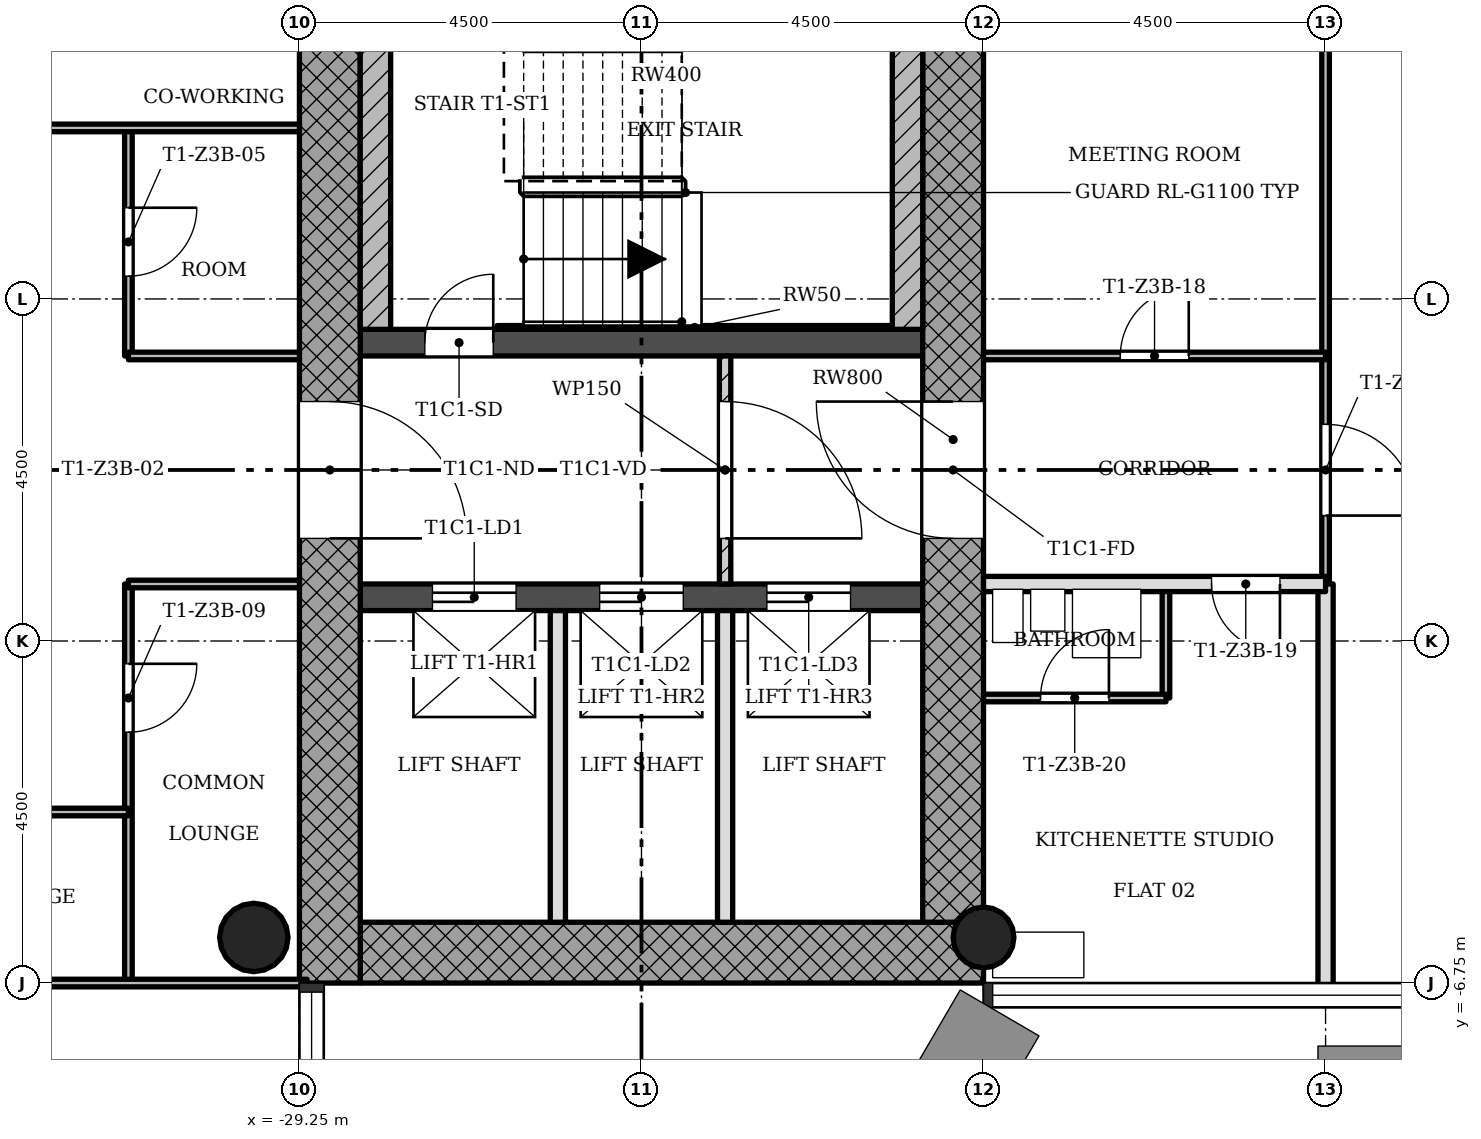
"""IFC4 building model, lengths in metres.
Left out: names, types, materials, properties, quantities, classifications, styles, units other than length and angle.
Written with IfcOpenShell. Run it as: python <this file> out.ifc"""

import sys

from ifc_helpers import new_model, si_unit, direction, frame, frame_2d, origin, origin_2d, place, context, subcontext, project, spatial, rectangle, hollow_circle, extrude, element, fill, save


model = new_model("IFC4")
c1 = context("Model", 3, precision=1e-05, world=origin(), true_north=direction((0.0, 1.0)))
c2 = subcontext(c1, "Body", "Model", "MODEL_VIEW")
j1 = project(units=[si_unit("LENGTHUNIT", "METRE"), si_unit("PLANEANGLEUNIT", "RADIAN")], contexts=[c1])
p1 = place(None, origin())
s1 = spatial("IfcSite", under=j1, at=p1, CompositionType="ELEMENT")
p2 = place(p1, origin())
s2 = spatial("IfcBuilding", under=s1, at=p2, CompositionType="ELEMENT")
p3 = place(p2, frame((0.0, 0.0, 143.9)))
s3 = spatial("IfcBuildingStorey", under=s2, at=p3, CompositionType="ELEMENT", Elevation=143.9)
p4 = place(p3, frame((-28.45, -6.35, 0.0), z_axis=(0.0, 0.0, 1.0), x_axis=(1.0, 0.0, 0.0)))
e1 = element("IfcWall", 1, at=p4, inside=s3, PredefinedType="SHEAR", context=c2, shape_type="SweptSolid", body=[
    extrude(rectangle(XDim=8.2, YDim=0.8, at=frame_2d((4.1, 0.0))), origin(), (0.0, 0.0, 1.0), 3.4),
])
p5 = place(p3, frame((-20.65, -5.95, 0.0), z_axis=(0.0, 0.0, 1.0), x_axis=(0.0, 1.0, 0.0)))
e2 = element("IfcWall", 2, at=p5, inside=s3, PredefinedType="SHEAR", context=c2, shape_type="SweptSolid", body=[
    extrude(rectangle(XDim=12.7, YDim=0.8, at=frame_2d((6.35, 0.0))), origin(), (0.0, 0.0, 1.0), 3.4),
])
p6 = place(p5, frame((5.05, 0.0, 0.0)))
e3 = element("IfcOpeningElement", 3, at=p6, cuts=e2, PredefinedType="OPENING", context=c2, shape_type="SweptSolid", body=[
    extrude(rectangle(XDim=1.8, YDim=2.1, at=frame_2d((0.9, 1.05))), frame((0.0, 0.41, 0.0), z_axis=(0.0, -1.0, 0.0), x_axis=(1.0, 0.0, 0.0)), (0.0, 0.0, 1.0), 0.82),
])
p7 = place(p3, frame((-28.85, 5.95, 0.0), z_axis=(0.0, 0.0, 1.0), x_axis=(0.0, -1.0, 0.0)))
e4 = element("IfcWall", 4, at=p7, inside=s3, PredefinedType="SHEAR", context=c2, shape_type="SweptSolid", body=[
    extrude(rectangle(XDim=12.7, YDim=0.8, at=frame_2d((6.35, 0.0))), origin(), (0.0, 0.0, 1.0), 3.4),
])
p8 = place(p7, frame((5.05, 0.0, 0.0)))
e5 = element("IfcOpeningElement", 5, at=p8, cuts=e4, PredefinedType="OPENING", context=c2, shape_type="SweptSolid", body=[
    extrude(rectangle(XDim=1.8, YDim=2.1, at=frame_2d((0.9, 1.05))), frame((0.0, 0.41, 0.0), z_axis=(0.0, -1.0, 0.0), x_axis=(1.0, 0.0, 0.0)), (0.0, 0.0, 1.0), 0.82),
])
p9 = place(p3, frame((-28.45, -1.675, 0.0), z_axis=(0.0, 0.0, 1.0), x_axis=(1.0, 0.0, 0.0)))
e6 = element("IfcWall", 6, at=p9, inside=s3, PredefinedType="SHEAR", context=c2, shape_type="SweptSolid", body=[
    extrude(rectangle(XDim=7.4, YDim=0.35, at=frame_2d((3.7, 0.0))), origin(), (0.0, 0.0, 1.0), 3.4),
])
p10 = place(p9, frame((0.95, 0.0, 0.0)))
e7 = element("IfcOpeningElement", 7, at=p10, cuts=e6, PredefinedType="OPENING", context=c2, shape_type="SweptSolid", body=[
    extrude(rectangle(XDim=1.1, YDim=2.1, at=frame_2d((0.55, 1.05))), frame((0.0, 0.185, 0.0), z_axis=(0.0, -1.0, 0.0), x_axis=(1.0, 0.0, 0.0)), (0.0, 0.0, 1.0), 0.37),
])
p11 = place(p9, frame((3.15, 0.0, 0.0)))
e8 = element("IfcOpeningElement", 8, at=p11, cuts=e6, PredefinedType="OPENING", context=c2, shape_type="SweptSolid", body=[
    extrude(rectangle(XDim=1.1, YDim=2.1, at=frame_2d((0.55, 1.05))), frame((0.0, 0.185, 0.0), z_axis=(0.0, -1.0, 0.0), x_axis=(1.0, 0.0, 0.0)), (0.0, 0.0, 1.0), 0.37),
])
p12 = place(p9, frame((5.35, 0.0, 0.0)))
e9 = element("IfcOpeningElement", 9, at=p12, cuts=e6, PredefinedType="OPENING", context=c2, shape_type="SweptSolid", body=[
    extrude(rectangle(XDim=1.1, YDim=2.1, at=frame_2d((0.55, 1.05))), frame((0.0, 0.185, 0.0), z_axis=(0.0, -1.0, 0.0), x_axis=(1.0, 0.0, 0.0)), (0.0, 0.0, 1.0), 0.37),
])
p13 = place(p3, frame((-28.45, 1.675, 0.0), z_axis=(0.0, 0.0, 1.0), x_axis=(1.0, 0.0, 0.0)))
e10 = element("IfcWall", 10, at=p13, inside=s3, PredefinedType="SHEAR", context=c2, shape_type="SweptSolid", body=[
    extrude(rectangle(XDim=7.4, YDim=0.35, at=frame_2d((3.7, 0.0))), origin(), (0.0, 0.0, 1.0), 3.4),
])
p14 = place(p13, frame((0.85, 0.0, 0.0)))
e11 = element("IfcOpeningElement", 11, at=p14, cuts=e10, PredefinedType="OPENING", context=c2, shape_type="SweptSolid", body=[
    extrude(rectangle(XDim=0.9, YDim=2.1, at=frame_2d((0.45, 1.05))), frame((0.0, 0.185, 0.0), z_axis=(0.0, -1.0, 0.0), x_axis=(1.0, 0.0, 0.0)), (0.0, 0.0, 1.0), 0.37),
])
p15 = place(p3, frame((-20.25, -6.15, 0.0), z_axis=(0.0, 0.0, 1.0), x_axis=(1.0, 0.0, 0.0)))
e12 = element("IfcColumn", 12, at=p15, inside=s3, PredefinedType="COLUMN", context=c2, shape_type="SweptSolid", body=[
    extrude(hollow_circle(Radius=0.4, WallThickness=0.028, at=origin_2d()), origin(), (0.0, 0.0, 1.0), 3.4),
])
p16 = place(p3, frame((-29.85, -6.15, 0.0), z_axis=(0.0, 0.0, 1.0), x_axis=(1.0, 0.0, 0.0)))
e13 = element("IfcColumn", 13, at=p16, inside=s3, PredefinedType="COLUMN", context=c2, shape_type="SweptSolid", body=[
    extrude(hollow_circle(Radius=0.45, WallThickness=0.032, at=origin_2d()), origin(), (0.0, 0.0, 1.0), 3.4),
])
p17 = place(p3, frame((-23.65, -1.5, 0.0), z_axis=(0.0, 0.0, 1.0), x_axis=(0.0, 1.0, 0.0)))
e14 = element("IfcWall", 14, at=p17, inside=s3, PredefinedType="PARTITIONING", context=c2, shape_type="SweptSolid", body=[
    extrude(rectangle(XDim=3.0, YDim=0.15, at=frame_2d((1.5, 0.0))), origin(), (0.0, 0.0, 1.0), 3.0),
])
p18 = place(p17, frame((0.6, 0.0, 0.0)))
e15 = element("IfcOpeningElement", 15, at=p18, cuts=e14, PredefinedType="OPENING", context=c2, shape_type="SweptSolid", body=[
    extrude(rectangle(XDim=1.8, YDim=2.1, at=frame_2d((0.9, 1.05))), frame((0.0, 0.085, 0.0), z_axis=(0.0, -1.0, 0.0), x_axis=(1.0, 0.0, 0.0)), (0.0, 0.0, 1.0), 0.17),
])
for number, where, z_axis, x_axis in (
    (16, (-25.85, -5.95, 0.0), (0.0, 0.0, 1.0), (0.0, 1.0, 0.0)),
    (17, (-23.65, -5.95, 0.0), (0.0, 0.0, 1.0), (0.0, 1.0, 0.0)),
):
    element("IfcWall", number, at=place(p3, frame(where, z_axis=z_axis, x_axis=x_axis)), inside=s3, PredefinedType="SOLIDWALL", context=c2, shape_type="SweptSolid", body=[
        extrude(rectangle(XDim=4.1, YDim=0.2, at=frame_2d((2.05, 0.0))), origin(), (0.0, 0.0, 1.0), 3.0),
    ])
p19 = place(p3, frame((-31.5, -6.75, 0.0), z_axis=(0.0, 0.0, 1.0), x_axis=(0.0, 1.0, 0.0)))
e18 = element("IfcWall", 18, at=p19, inside=s3, PredefinedType="PARTITIONING", context=c2, shape_type="SweptSolid", body=[
    extrude(rectangle(XDim=5.25, YDim=0.1, at=frame_2d((2.625, 0.0))), origin(), (0.0, 0.0, 1.0), 3.0),
])
p20 = place(p19, frame((3.3, 0.0, 0.0)))
e19 = element("IfcOpeningElement", 19, at=p20, cuts=e18, PredefinedType="OPENING", context=c2, shape_type="SweptSolid", body=[
    extrude(rectangle(XDim=0.9, YDim=2.1, at=frame_2d((0.45, 1.05))), frame((0.0, 0.06, 0.0), z_axis=(0.0, -1.0, 0.0), x_axis=(1.0, 0.0, 0.0)), (0.0, 0.0, 1.0), 0.12),
])
p21 = place(p3, frame((-31.5, 1.5, 0.0), z_axis=(0.0, 0.0, 1.0), x_axis=(0.0, 1.0, 0.0)))
e20 = element("IfcWall", 20, at=p21, inside=s3, PredefinedType="PARTITIONING", context=c2, shape_type="SweptSolid", body=[
    extrude(rectangle(XDim=3.0, YDim=0.1, at=frame_2d((1.5, 0.0))), origin(), (0.0, 0.0, 1.0), 3.0),
])
p22 = place(p21, frame((1.05, 0.0, 0.0)))
e21 = element("IfcOpeningElement", 21, at=p22, cuts=e20, PredefinedType="OPENING", context=c2, shape_type="SweptSolid", body=[
    extrude(rectangle(XDim=0.9, YDim=2.1, at=frame_2d((0.45, 1.05))), frame((0.0, 0.06, 0.0), z_axis=(0.0, -1.0, 0.0), x_axis=(1.0, 0.0, 0.0)), (0.0, 0.0, 1.0), 0.12),
])
p23 = place(p3, frame((-17.85, -3.0, 0.0), z_axis=(0.0, 0.0, 1.0), x_axis=(0.0, 1.0, 0.0)))
e22 = element("IfcWall", 22, at=p23, inside=s3, PredefinedType="PARTITIONING", context=c2, shape_type="SweptSolid", body=[
    extrude(rectangle(XDim=1.5, YDim=0.1, at=frame_2d((0.75, 0.0))), origin(), (0.0, 0.0, 1.0), 3.0),
])
p24 = place(p3, frame((-15.75, -1.5, 0.0), z_axis=(0.0, 0.0, 1.0), x_axis=(0.0, 1.0, 0.0)))
e23 = element("IfcWall", 23, at=p24, inside=s3, PredefinedType="PARTITIONING", context=c2, shape_type="SweptSolid", body=[
    extrude(rectangle(XDim=8.35, YDim=0.1, at=frame_2d((4.175, 0.0))), origin(), (0.0, 0.0, 1.0), 3.0),
])
p25 = place(p24, frame((0.9, 0.0, 0.0)))
e24 = element("IfcOpeningElement", 24, at=p25, cuts=e23, PredefinedType="OPENING", context=c2, shape_type="SweptSolid", body=[
    extrude(rectangle(XDim=1.2, YDim=2.1, at=frame_2d((0.6, 1.05))), frame((0.0, 0.06, 0.0), z_axis=(0.0, -1.0, 0.0), x_axis=(1.0, 0.0, 0.0)), (0.0, 0.0, 1.0), 0.12),
])
p26 = place(p3, frame((-15.75, -6.85, 0.0), z_axis=(0.0, 0.0, 1.0), x_axis=(0.0, 1.0, 0.0)))
e25 = element("IfcWall", 25, at=p26, inside=s3, PredefinedType="SOLIDWALL", context=c2, shape_type="SweptSolid", body=[
    extrude(rectangle(XDim=5.35, YDim=0.2, at=frame_2d((2.675, 0.0))), origin(), (0.0, 0.0, 1.0), 3.0),
])
p27 = place(p3, frame((-35.1, -6.75, 0.0), z_axis=(0.0, 0.0, 1.0), x_axis=(1.0, 0.0, 0.0)))
e26 = element("IfcWall", 26, at=p27, inside=s3, PredefinedType="PARTITIONING", context=c2, shape_type="SweptSolid", body=[
    extrude(rectangle(XDim=5.95, YDim=0.1, at=frame_2d((2.975, 0.0))), origin(), (0.0, 0.0, 1.0), 3.0),
])
p28 = place(p3, frame((-35.1, -4.5, 0.0), z_axis=(0.0, 0.0, 1.0), x_axis=(1.0, 0.0, 0.0)))
e27 = element("IfcWall", 27, at=p28, inside=s3, PredefinedType="PARTITIONING", context=c2, shape_type="SweptSolid", body=[
    extrude(rectangle(XDim=3.6, YDim=0.1, at=frame_2d((1.8, 0.0))), origin(), (0.0, 0.0, 1.0), 3.0),
])
p29 = place(p28, frame((1.35, 0.0, 0.0)))
e28 = element("IfcOpeningElement", 28, at=p29, cuts=e27, PredefinedType="OPENING", context=c2, shape_type="SweptSolid", body=[
    extrude(rectangle(XDim=0.9, YDim=2.1, at=frame_2d((0.45, 1.05))), frame((0.0, 0.06, 0.0), z_axis=(0.0, -1.0, 0.0), x_axis=(1.0, 0.0, 0.0)), (0.0, 0.0, 1.0), 0.12),
])
p30 = place(p3, frame((-20.25, -3.0, 0.0), z_axis=(0.0, 0.0, 1.0), x_axis=(1.0, 0.0, 0.0)))
e29 = element("IfcWall", 29, at=p30, inside=s3, PredefinedType="PARTITIONING", context=c2, shape_type="SweptSolid", body=[
    extrude(rectangle(XDim=2.4, YDim=0.1, at=frame_2d((1.2, 0.0))), origin(), (0.0, 0.0, 1.0), 3.0),
])
p31 = place(p30, frame((0.75, 0.0, 0.0)))
e30 = element("IfcOpeningElement", 30, at=p31, cuts=e29, PredefinedType="OPENING", context=c2, shape_type="SweptSolid", body=[
    extrude(rectangle(XDim=0.9, YDim=2.1, at=frame_2d((0.45, 1.05))), frame((0.0, 0.06, 0.0), z_axis=(0.0, -1.0, 0.0), x_axis=(1.0, 0.0, 0.0)), (0.0, 0.0, 1.0), 0.12),
])
p32 = place(p3, frame((-31.5, -1.5, 0.0), z_axis=(0.0, 0.0, 1.0), x_axis=(1.0, 0.0, 0.0)))
e31 = element("IfcWall", 31, at=p32, inside=s3, PredefinedType="PARTITIONING", context=c2, shape_type="SweptSolid", body=[
    extrude(rectangle(XDim=2.25, YDim=0.1, at=frame_2d((1.125, 0.0))), origin(), (0.0, 0.0, 1.0), 3.0),
])
p33 = place(p3, frame((-20.25, -1.5, 0.0), z_axis=(0.0, 0.0, 1.0), x_axis=(1.0, 0.0, 0.0)))
e32 = element("IfcWall", 32, at=p33, inside=s3, PredefinedType="SOLIDWALL", context=c2, shape_type="SweptSolid", body=[
    extrude(rectangle(XDim=4.5, YDim=0.2, at=frame_2d((2.25, 0.0))), origin(), (0.0, 0.0, 1.0), 3.0),
])
p34 = place(p33, frame((3.0, 0.0, 0.0)))
e33 = element("IfcOpeningElement", 33, at=p34, cuts=e32, PredefinedType="OPENING", context=c2, shape_type="SweptSolid", body=[
    extrude(rectangle(XDim=0.9, YDim=2.1, at=frame_2d((0.45, 1.05))), frame((0.0, 0.11, 0.0), z_axis=(0.0, -1.0, 0.0), x_axis=(1.0, 0.0, 0.0)), (0.0, 0.0, 1.0), 0.22),
])
p35 = place(p3, frame((-31.5, 1.5, 0.0), z_axis=(0.0, 0.0, 1.0), x_axis=(1.0, 0.0, 0.0)))
e34 = element("IfcWall", 34, at=p35, inside=s3, PredefinedType="PARTITIONING", context=c2, shape_type="SweptSolid", body=[
    extrude(rectangle(XDim=2.25, YDim=0.1, at=frame_2d((1.125, 0.0))), origin(), (0.0, 0.0, 1.0), 3.0),
])
p36 = place(p3, frame((-20.25, 1.5, 0.0), z_axis=(0.0, 0.0, 1.0), x_axis=(1.0, 0.0, 0.0)))
e35 = element("IfcWall", 35, at=p36, inside=s3, PredefinedType="PARTITIONING", context=c2, shape_type="SweptSolid", body=[
    extrude(rectangle(XDim=4.5, YDim=0.1, at=frame_2d((2.25, 0.0))), origin(), (0.0, 0.0, 1.0), 3.0),
])
p37 = place(p36, frame((1.8, 0.0, 0.0)))
e36 = element("IfcOpeningElement", 36, at=p37, cuts=e35, PredefinedType="OPENING", context=c2, shape_type="SweptSolid", body=[
    extrude(rectangle(XDim=0.9, YDim=2.1, at=frame_2d((0.45, 1.05))), frame((0.0, 0.06, 0.0), z_axis=(0.0, -1.0, 0.0), x_axis=(1.0, 0.0, 0.0)), (0.0, 0.0, 1.0), 0.12),
])
p38 = place(p3, frame((-35.1, 4.5, 0.0), z_axis=(0.0, 0.0, 1.0), x_axis=(1.0, 0.0, 0.0)))
e37 = element("IfcWall", 37, at=p38, inside=s3, PredefinedType="PARTITIONING", context=c2, shape_type="SweptSolid", body=[
    extrude(rectangle(XDim=5.85, YDim=0.1, at=frame_2d((2.925, 0.0))), origin(), (0.0, 0.0, 1.0), 3.0),
])
p39 = place(p38, frame((1.35, 0.0, 0.0)))
e38 = element("IfcOpeningElement", 38, at=p39, cuts=e37, PredefinedType="OPENING", context=c2, shape_type="SweptSolid", body=[
    extrude(rectangle(XDim=0.9, YDim=2.1, at=frame_2d((0.45, 1.05))), frame((0.0, 0.06, 0.0), z_axis=(0.0, -1.0, 0.0), x_axis=(1.0, 0.0, 0.0)), (0.0, 0.0, 1.0), 0.12),
])
for number, where, z_axis, x_axis in (
    (39, (-21.25, 1.85, 0.0), (0.0, 0.0, 1.0), (0.0, 1.0, 0.0)),
    (40, (-28.25, 1.85, 0.0), (0.0, 0.0, 1.0), (0.0, 1.0, 0.0)),
):
    element("IfcWall", number, at=place(p3, frame(where, z_axis=z_axis, x_axis=x_axis)), inside=s3, PredefinedType="SHEAR", context=c2, shape_type="SweptSolid", body=[
        extrude(rectangle(XDim=4.1, YDim=0.4, at=frame_2d((2.05, 0.0))), origin(), (0.0, 0.0, 1.0), 3.4),
    ])
p40 = place(p3, frame((-26.65, 1.875, 0.0), z_axis=(0.0, 0.0, 1.0), x_axis=(1.0, 0.0, 0.0)))
e41 = element("IfcWall", 41, at=p40, inside=s3, PredefinedType="SHEAR", context=c2, shape_type="SweptSolid", body=[
    extrude(rectangle(XDim=5.2, YDim=0.05, at=frame_2d((2.6, 0.0))), origin(), (0.0, 0.0, 1.0), 3.4),
])
p41 = place(p18, origin())
e42 = element("IfcDoor", 42, at=p41, inside=s3, OperationType="SINGLE_SWING_LEFT", PredefinedType="DOOR", context=c2, shape_type="SweptSolid", body=[
    extrude(rectangle(XDim=1.8, YDim=2.1, at=frame_2d((0.9, 1.05))), frame((0.0, 0.025, 0.0), z_axis=(0.0, -1.0, 0.0), x_axis=(1.0, 0.0, 0.0)), (0.0, 0.0, 1.0), 0.05),
])
fill(e15, e42)
p42 = place(p22, origin())
e43 = element("IfcDoor", 43, at=p42, inside=s3, OperationType="SINGLE_SWING_RIGHT", PredefinedType="DOOR", context=c2, shape_type="SweptSolid", body=[
    extrude(rectangle(XDim=0.9, YDim=2.1, at=frame_2d((0.45, 1.05))), frame((0.0, 0.025, 0.0), z_axis=(0.0, -1.0, 0.0), x_axis=(1.0, 0.0, 0.0)), (0.0, 0.0, 1.0), 0.05),
])
fill(e21, e43)
p43 = place(p20, origin())
e44 = element("IfcDoor", 44, at=p43, inside=s3, OperationType="SINGLE_SWING_RIGHT", PredefinedType="DOOR", context=c2, shape_type="SweptSolid", body=[
    extrude(rectangle(XDim=0.9, YDim=2.1, at=frame_2d((0.45, 1.05))), frame((0.0, 0.025, 0.0), z_axis=(0.0, -1.0, 0.0), x_axis=(1.0, 0.0, 0.0)), (0.0, 0.0, 1.0), 0.05),
])
fill(e19, e44)
p44 = place(p37, origin())
e45 = element("IfcDoor", 45, at=p44, inside=s3, OperationType="SINGLE_SWING_LEFT", PredefinedType="DOOR", context=c2, shape_type="SweptSolid", body=[
    extrude(rectangle(XDim=0.9, YDim=2.1, at=frame_2d((0.45, 1.05))), frame((0.0, 0.025, 0.0), z_axis=(0.0, -1.0, 0.0), x_axis=(1.0, 0.0, 0.0)), (0.0, 0.0, 1.0), 0.05),
])
fill(e36, e45)
p45 = place(p34, origin())
e46 = element("IfcDoor", 46, at=p45, inside=s3, OperationType="SINGLE_SWING_RIGHT", PredefinedType="DOOR", context=c2, shape_type="SweptSolid", body=[
    extrude(rectangle(XDim=0.9, YDim=2.1, at=frame_2d((0.45, 1.05))), frame((0.0, 0.025, 0.0), z_axis=(0.0, -1.0, 0.0), x_axis=(1.0, 0.0, 0.0)), (0.0, 0.0, 1.0), 0.05),
])
fill(e33, e46)
p46 = place(p31, origin())
e47 = element("IfcDoor", 47, at=p46, inside=s3, OperationType="SINGLE_SWING_LEFT", PredefinedType="DOOR", context=c2, shape_type="SweptSolid", body=[
    extrude(rectangle(XDim=0.9, YDim=2.1, at=frame_2d((0.45, 1.05))), frame((0.0, 0.025, 0.0), z_axis=(0.0, -1.0, 0.0), x_axis=(1.0, 0.0, 0.0)), (0.0, 0.0, 1.0), 0.05),
])
fill(e30, e47)
p47 = place(p25, origin())
e48 = element("IfcDoor", 48, at=p47, inside=s3, OperationType="SINGLE_SWING_LEFT", PredefinedType="DOOR", context=c2, shape_type="SweptSolid", body=[
    extrude(rectangle(XDim=1.2, YDim=2.1, at=frame_2d((0.6, 1.05))), frame((0.0, 0.025, 0.0), z_axis=(0.0, -1.0, 0.0), x_axis=(1.0, 0.0, 0.0)), (0.0, 0.0, 1.0), 0.05),
])
fill(e24, e48)
p48 = place(p14, origin())
e49 = element("IfcDoor", 49, at=p48, inside=s3, OperationType="SINGLE_SWING_LEFT", PredefinedType="DOOR", context=c2, shape_type="SweptSolid", body=[
    extrude(rectangle(XDim=0.9, YDim=2.1, at=frame_2d((0.45, 1.05))), frame((0.0, 0.025, 0.0), z_axis=(0.0, -1.0, 0.0), x_axis=(1.0, 0.0, 0.0)), (0.0, 0.0, 1.0), 0.05),
])
fill(e11, e49)
p49 = place(p10, origin())
e50 = element("IfcDoor", 50, at=p49, inside=s3, OperationType="SLIDING_TO_LEFT", PredefinedType="DOOR", context=c2, shape_type="SweptSolid", body=[
    extrude(rectangle(XDim=1.1, YDim=2.1, at=frame_2d((0.55, 1.05))), frame((0.0, 0.025, 0.0), z_axis=(0.0, -1.0, 0.0), x_axis=(1.0, 0.0, 0.0)), (0.0, 0.0, 1.0), 0.05),
])
fill(e7, e50)
p50 = place(p11, origin())
e51 = element("IfcDoor", 51, at=p50, inside=s3, OperationType="SLIDING_TO_LEFT", PredefinedType="DOOR", context=c2, shape_type="SweptSolid", body=[
    extrude(rectangle(XDim=1.1, YDim=2.1, at=frame_2d((0.55, 1.05))), frame((0.0, 0.025, 0.0), z_axis=(0.0, -1.0, 0.0), x_axis=(1.0, 0.0, 0.0)), (0.0, 0.0, 1.0), 0.05),
])
fill(e8, e51)
p51 = place(p12, origin())
e52 = element("IfcDoor", 52, at=p51, inside=s3, OperationType="SLIDING_TO_LEFT", PredefinedType="DOOR", context=c2, shape_type="SweptSolid", body=[
    extrude(rectangle(XDim=1.1, YDim=2.1, at=frame_2d((0.55, 1.05))), frame((0.0, 0.025, 0.0), z_axis=(0.0, -1.0, 0.0), x_axis=(1.0, 0.0, 0.0)), (0.0, 0.0, 1.0), 0.05),
])
fill(e9, e52)
p52 = place(p8, origin())
e53 = element("IfcDoor", 53, at=p52, inside=s3, OperationType="SINGLE_SWING_LEFT", PredefinedType="DOOR", context=c2, shape_type="SweptSolid", body=[
    extrude(rectangle(XDim=1.8, YDim=2.1, at=frame_2d((0.9, 1.05))), frame((0.0, 0.025, 0.0), z_axis=(0.0, -1.0, 0.0), x_axis=(1.0, 0.0, 0.0)), (0.0, 0.0, 1.0), 0.05),
])
fill(e5, e53)
p53 = place(p6, origin())
e54 = element("IfcDoor", 54, at=p53, inside=s3, OperationType="SINGLE_SWING_LEFT", PredefinedType="DOOR", context=c2, shape_type="SweptSolid", body=[
    extrude(rectangle(XDim=1.8, YDim=2.1, at=frame_2d((0.9, 1.05))), frame((0.0, 0.025, 0.0), z_axis=(0.0, -1.0, 0.0), x_axis=(1.0, 0.0, 0.0)), (0.0, 0.0, 1.0), 0.05),
])
fill(e3, e54)
save(model, sys.argv[1])
